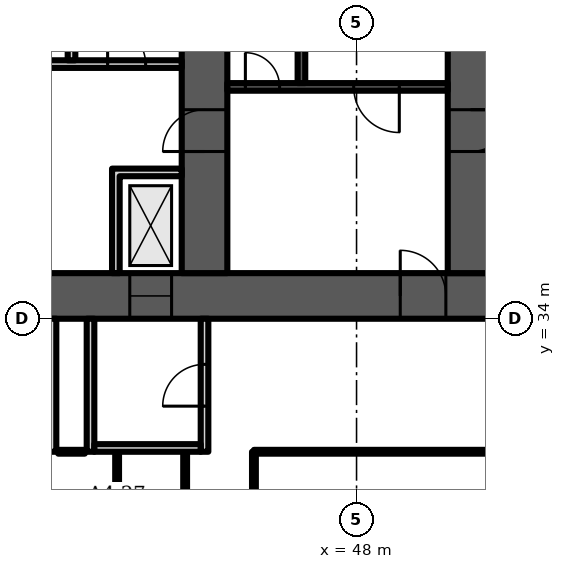
"""IFC4 building model, lengths in metres.
Left out: names, types, materials, properties, quantities, classifications, styles, units other than length and angle.
Written with IfcOpenShell. Run it as: python <this file> out.ifc"""

import sys

from ifc_helpers import new_model, si_unit, direction, frame, frame_2d, origin, place, context, subcontext, project, spatial, polyline, rectangle, outline, extrude, element, fill, save


model = new_model("IFC4")
c1 = context("Model", 3, precision=1e-05, world=origin(), true_north=direction((0.0, 1.0)))
c2 = subcontext(c1, "Body", "Model", "MODEL_VIEW")
j1 = project(units=[si_unit("LENGTHUNIT", "METRE"), si_unit("PLANEANGLEUNIT", "RADIAN")], contexts=[c1])
p1 = place(None, origin())
s1 = spatial("IfcSite", under=j1, at=p1, CompositionType="ELEMENT")
p2 = place(p1, origin())
s2 = spatial("IfcBuilding", under=s1, at=p2, CompositionType="ELEMENT")
p3 = place(p2, frame((0.0, 0.0, 81.1)))
s3 = spatial("IfcBuildingStorey", under=s2, at=p3, CompositionType="ELEMENT", Elevation=81.1)
p4 = place(p3, frame((9.0, 34.6, 0.0), z_axis=(0.0, 0.0, 1.0), x_axis=(1.0, 0.0, 0.0)))
e1 = element("IfcWall", 1, at=p4, inside=s3, PredefinedType="SHEAR", context=c2, shape_type="SweptSolid", body=[
    extrude(rectangle(XDim=56.0, YDim=1.2, at=frame_2d((28.0, 0.0))), origin(), (0.0, 0.0, 1.0), 3.6),
])
p5 = place(p4, frame((2.0, 0.0, 0.0)))
e2 = element("IfcOpeningElement", 2, at=p5, cuts=e1, PredefinedType="OPENING", context=c2, shape_type="SweptSolid", body=[
    extrude(rectangle(XDim=1.0, YDim=2.1, at=frame_2d((0.5, 1.05))), frame((0.0, 0.61, 0.0), z_axis=(0.0, -1.0, 0.0), x_axis=(1.0, 0.0, 0.0)), (0.0, 0.0, 1.0), 1.22),
])
p6 = place(p4, frame((4.6, 0.0, 0.0)))
e3 = element("IfcOpeningElement", 3, at=p6, cuts=e1, PredefinedType="OPENING", context=c2, shape_type="SweptSolid", body=[
    extrude(rectangle(XDim=1.0, YDim=2.1, at=frame_2d((0.5, 1.05))), frame((0.0, 0.61, 0.0), z_axis=(0.0, -1.0, 0.0), x_axis=(1.0, 0.0, 0.0)), (0.0, 0.0, 1.0), 1.22),
])
p7 = place(p4, frame((7.867, 0.0, 0.0)))
e4 = element("IfcOpeningElement", 4, at=p7, cuts=e1, PredefinedType="OPENING", context=c2, shape_type="SweptSolid", body=[
    extrude(rectangle(XDim=1.1, YDim=2.1, at=frame_2d((0.55, 1.05))), frame((0.0, 0.61, 0.0), z_axis=(0.0, -1.0, 0.0), x_axis=(1.0, 0.0, 0.0)), (0.0, 0.0, 1.0), 1.22),
])
p8 = place(p4, frame((12.033, 0.0, 0.0)))
e5 = element("IfcOpeningElement", 5, at=p8, cuts=e1, PredefinedType="OPENING", context=c2, shape_type="SweptSolid", body=[
    extrude(rectangle(XDim=1.1, YDim=2.1, at=frame_2d((0.55, 1.05))), frame((0.0, 0.61, 0.0), z_axis=(0.0, -1.0, 0.0), x_axis=(1.0, 0.0, 0.0)), (0.0, 0.0, 1.0), 1.22),
])
p9 = place(p4, frame((9.8, 0.0, 0.0)))
e6 = element("IfcOpeningElement", 6, at=p9, cuts=e1, PredefinedType="OPENING", context=c2, shape_type="SweptSolid", body=[
    extrude(rectangle(XDim=1.4, YDim=2.1, at=frame_2d((0.7, 1.05))), frame((0.0, 0.61, 0.0), z_axis=(0.0, -1.0, 0.0), x_axis=(1.0, 0.0, 0.0)), (0.0, 0.0, 1.0), 1.22),
])
p10 = place(p4, frame((14.65, 0.0, 0.0)))
e7 = element("IfcOpeningElement", 7, at=p10, cuts=e1, PredefinedType="OPENING", context=c2, shape_type="SweptSolid", body=[
    extrude(rectangle(XDim=1.2, YDim=2.1, at=frame_2d((0.6, 1.05))), frame((0.0, 0.61, 0.0), z_axis=(0.0, -1.0, 0.0), x_axis=(1.0, 0.0, 0.0)), (0.0, 0.0, 1.0), 1.22),
])
p11 = place(p4, frame((21.867, 0.0, 0.0)))
e8 = element("IfcOpeningElement", 8, at=p11, cuts=e1, PredefinedType="OPENING", context=c2, shape_type="SweptSolid", body=[
    extrude(rectangle(XDim=1.1, YDim=2.1, at=frame_2d((0.55, 1.05))), frame((0.0, 0.61, 0.0), z_axis=(0.0, -1.0, 0.0), x_axis=(1.0, 0.0, 0.0)), (0.0, 0.0, 1.0), 1.22),
])
p12 = place(p4, frame((26.033, 0.0, 0.0)))
e9 = element("IfcOpeningElement", 9, at=p12, cuts=e1, PredefinedType="OPENING", context=c2, shape_type="SweptSolid", body=[
    extrude(rectangle(XDim=1.1, YDim=2.1, at=frame_2d((0.55, 1.05))), frame((0.0, 0.61, 0.0), z_axis=(0.0, -1.0, 0.0), x_axis=(1.0, 0.0, 0.0)), (0.0, 0.0, 1.0), 1.22),
])
p13 = place(p4, frame((23.8, 0.0, 0.0)))
e10 = element("IfcOpeningElement", 10, at=p13, cuts=e1, PredefinedType="OPENING", context=c2, shape_type="SweptSolid", body=[
    extrude(rectangle(XDim=1.4, YDim=2.1, at=frame_2d((0.7, 1.05))), frame((0.0, 0.61, 0.0), z_axis=(0.0, -1.0, 0.0), x_axis=(1.0, 0.0, 0.0)), (0.0, 0.0, 1.0), 1.22),
])
p14 = place(p4, frame((28.867, 0.0, 0.0)))
e11 = element("IfcOpeningElement", 11, at=p14, cuts=e1, PredefinedType="OPENING", context=c2, shape_type="SweptSolid", body=[
    extrude(rectangle(XDim=1.1, YDim=2.1, at=frame_2d((0.55, 1.05))), frame((0.0, 0.61, 0.0), z_axis=(0.0, -1.0, 0.0), x_axis=(1.0, 0.0, 0.0)), (0.0, 0.0, 1.0), 1.22),
])
p15 = place(p4, frame((33.033, 0.0, 0.0)))
e12 = element("IfcOpeningElement", 12, at=p15, cuts=e1, PredefinedType="OPENING", context=c2, shape_type="SweptSolid", body=[
    extrude(rectangle(XDim=1.1, YDim=2.1, at=frame_2d((0.55, 1.05))), frame((0.0, 0.61, 0.0), z_axis=(0.0, -1.0, 0.0), x_axis=(1.0, 0.0, 0.0)), (0.0, 0.0, 1.0), 1.22),
])
p16 = place(p4, frame((40.15, 0.0, 0.0)))
e13 = element("IfcOpeningElement", 13, at=p16, cuts=e1, PredefinedType="OPENING", context=c2, shape_type="SweptSolid", body=[
    extrude(rectangle(XDim=1.2, YDim=2.1, at=frame_2d((0.6, 1.05))), frame((0.0, 0.61, 0.0), z_axis=(0.0, -1.0, 0.0), x_axis=(1.0, 0.0, 0.0)), (0.0, 0.0, 1.0), 1.22),
])
p17 = place(p4, frame((44.8, 0.0, 0.0)))
e14 = element("IfcOpeningElement", 14, at=p17, cuts=e1, PredefinedType="OPENING", context=c2, shape_type="SweptSolid", body=[
    extrude(rectangle(XDim=1.4, YDim=2.1, at=frame_2d((0.7, 1.05))), frame((0.0, 0.61, 0.0), z_axis=(0.0, -1.0, 0.0), x_axis=(1.0, 0.0, 0.0)), (0.0, 0.0, 1.0), 1.22),
])
p18 = place(p4, frame((49.867, 0.0, 0.0)))
e15 = element("IfcOpeningElement", 15, at=p18, cuts=e1, PredefinedType="OPENING", context=c2, shape_type="SweptSolid", body=[
    extrude(rectangle(XDim=1.1, YDim=2.1, at=frame_2d((0.55, 1.05))), frame((0.0, 0.61, 0.0), z_axis=(0.0, -1.0, 0.0), x_axis=(1.0, 0.0, 0.0)), (0.0, 0.0, 1.0), 1.22),
])
p19 = place(p4, frame((53.5, 0.0, 0.0)))
e16 = element("IfcOpeningElement", 16, at=p19, cuts=e1, PredefinedType="OPENING", context=c2, shape_type="SweptSolid", body=[
    extrude(rectangle(XDim=1.1, YDim=2.1, at=frame_2d((0.55, 1.05))), frame((0.0, 0.61, 0.0), z_axis=(0.0, -1.0, 0.0), x_axis=(1.0, 0.0, 0.0)), (0.0, 0.0, 1.0), 1.22),
])
p20 = place(p4, frame((51.567, 0.0, 0.0)))
e17 = element("IfcOpeningElement", 17, at=p20, cuts=e1, PredefinedType="OPENING", context=c2, shape_type="SweptSolid", body=[
    extrude(rectangle(XDim=1.4, YDim=2.1, at=frame_2d((0.7, 1.05))), frame((0.0, 0.61, 0.0), z_axis=(0.0, -1.0, 0.0), x_axis=(1.0, 0.0, 0.0)), (0.0, 0.0, 1.0), 1.22),
])
p21 = place(p3, frame((44.0, 35.2, 0.0), z_axis=(0.0, 0.0, 1.0), x_axis=(0.0, 1.0, 0.0)))
e18 = element("IfcWall", 18, at=p21, inside=s3, PredefinedType="SHEAR", context=c2, shape_type="SweptSolid", body=[
    extrude(rectangle(XDim=14.168, YDim=1.2, at=frame_2d((7.084, 0.0))), origin(), (0.0, 0.0, 1.0), 3.6),
])
p22 = place(p21, frame((3.2, 0.0, 0.0)))
e19 = element("IfcOpeningElement", 19, at=p22, cuts=e18, PredefinedType="OPENING", context=c2, shape_type="SweptSolid", body=[
    extrude(rectangle(XDim=1.1, YDim=2.1, at=frame_2d((0.55, 1.05))), frame((0.0, 0.61, 0.0), z_axis=(0.0, -1.0, 0.0), x_axis=(1.0, 0.0, 0.0)), (0.0, 0.0, 1.0), 1.22),
])
p23 = place(p21, frame((9.6, 0.0, 0.0)))
e20 = element("IfcOpeningElement", 20, at=p23, cuts=e18, PredefinedType="OPENING", context=c2, shape_type="SweptSolid", body=[
    extrude(rectangle(XDim=1.0, YDim=2.1, at=frame_2d((0.5, 1.05))), frame((0.0, 0.61, 0.0), z_axis=(0.0, -1.0, 0.0), x_axis=(1.0, 0.0, 0.0)), (0.0, 0.0, 1.0), 1.22),
])
p24 = place(p3, frame((51.0, 35.2, 0.0), z_axis=(0.0, 0.0, 1.0), x_axis=(0.0, 1.0, 0.0)))
e21 = element("IfcWall", 21, at=p24, inside=s3, PredefinedType="SHEAR", context=c2, shape_type="SweptSolid", body=[
    extrude(rectangle(XDim=13.555, YDim=1.2, at=frame_2d((6.778, 0.0))), origin(), (0.0, 0.0, 1.0), 3.6),
])
p25 = place(p24, frame((3.2, 0.0, 0.0)))
e22 = element("IfcOpeningElement", 22, at=p25, cuts=e21, PredefinedType="OPENING", context=c2, shape_type="SweptSolid", body=[
    extrude(rectangle(XDim=1.1, YDim=2.1, at=frame_2d((0.55, 1.05))), frame((0.0, 0.61, 0.0), z_axis=(0.0, -1.0, 0.0), x_axis=(1.0, 0.0, 0.0)), (0.0, 0.0, 1.0), 1.22),
])
p26 = place(p3, frame((37.6, 40.7, 0.0), z_axis=(0.0, 0.0, 1.0), x_axis=(1.0, 0.0, 0.0)))
e23 = element("IfcWall", 23, at=p26, inside=s3, PredefinedType="PARTITIONING", context=c2, shape_type="SweptSolid", body=[
    extrude(rectangle(XDim=5.8, YDim=0.2, at=frame_2d((2.9, 0.0))), origin(), (0.0, 0.0, 1.0), 3.2),
])
p27 = place(p26, frame((0.95, 0.0, 0.0)))
e24 = element("IfcOpeningElement", 24, at=p27, cuts=e23, PredefinedType="OPENING", context=c2, shape_type="SweptSolid", body=[
    extrude(rectangle(XDim=1.0, YDim=2.1, at=frame_2d((0.5, 1.05))), frame((0.0, 0.11, 0.0), z_axis=(0.0, -1.0, 0.0), x_axis=(1.0, 0.0, 0.0)), (0.0, 0.0, 1.0), 0.22),
])
p28 = place(p26, frame((3.85, 0.0, 0.0)))
e25 = element("IfcOpeningElement", 25, at=p28, cuts=e23, PredefinedType="OPENING", context=c2, shape_type="SweptSolid", body=[
    extrude(rectangle(XDim=1.0, YDim=2.1, at=frame_2d((0.5, 1.05))), frame((0.0, 0.11, 0.0), z_axis=(0.0, -1.0, 0.0), x_axis=(1.0, 0.0, 0.0)), (0.0, 0.0, 1.0), 0.22),
])
p29 = place(p3, frame((0.0, 0.0, -0.0)))
e26 = element("IfcWall", 26, at=p29, inside=s3, PredefinedType="PARTITIONING", context=c2, shape_type="SweptSolid", body=[
    extrude(outline(polyline([(41.567, 37.95), (41.767, 37.95), (43.4, 37.95), (43.4, 37.75), (41.767, 37.75), (41.767, 35.2), (41.567, 35.2), (41.567, 37.95)])), origin(), (0.0, 0.0, 1.0), 3.2),
])
p30 = place(p3, frame((40.5, 40.8, 0.0), z_axis=(0.0, 0.0, 1.0), x_axis=(0.0, 1.0, 0.0)))
e27 = element("IfcWall", 27, at=p30, inside=s3, PredefinedType="PARTITIONING", context=c2, shape_type="SweptSolid", body=[
    extrude(rectangle(XDim=8.653, YDim=0.2, at=frame_2d((4.326, 0.0))), origin(), (0.0, 0.0, 1.0), 3.2),
])
p31 = place(p3, frame((44.6, 40.1, 0.0), z_axis=(0.0, 0.0, 1.0), x_axis=(1.0, 0.0, 0.0)))
e28 = element("IfcWall", 28, at=p31, inside=s3, PredefinedType="SHEAR", context=c2, shape_type="SweptSolid", body=[
    extrude(rectangle(XDim=5.8, YDim=0.2, at=frame_2d((2.9, 0.0))), origin(), (0.0, 0.0, 1.0), 3.2),
])
p32 = place(p31, frame((3.325, 0.0, 0.0)))
e29 = element("IfcOpeningElement", 29, at=p32, cuts=e28, PredefinedType="OPENING", context=c2, shape_type="SweptSolid", body=[
    extrude(rectangle(XDim=1.2, YDim=2.1, at=frame_2d((0.6, 1.05))), frame((0.0, 0.11, 0.0), z_axis=(0.0, -1.0, 0.0), x_axis=(1.0, 0.0, 0.0)), (0.0, 0.0, 1.0), 0.22),
])
p33 = place(p31, frame((0.475, 0.0, 0.0)))
e30 = element("IfcOpeningElement", 30, at=p33, cuts=e28, PredefinedType="OPENING", context=c2, shape_type="SweptSolid", body=[
    extrude(rectangle(XDim=0.9, YDim=2.1, at=frame_2d((0.45, 1.05))), frame((0.0, 0.11, 0.0), z_axis=(0.0, -1.0, 0.0), x_axis=(1.0, 0.0, 0.0)), (0.0, 0.0, 1.0), 0.22),
])
p34 = place(p3, frame((46.55, 40.2, 0.0), z_axis=(0.0, 0.0, 1.0), x_axis=(0.0, 1.0, 0.0)))
e31 = element("IfcWall", 31, at=p34, inside=s3, PredefinedType="SHEAR", context=c2, shape_type="SweptSolid", body=[
    extrude(rectangle(XDim=7.2, YDim=0.2, at=frame_2d((3.6, 0.0))), origin(), (0.0, 0.0, 1.0), 3.2),
])
for number, where, z_axis, x_axis in (
    (32, (40.0, 30.5, 0.0), (0.0, 0.0, 1.0), (0.0, 1.0, 0.0)),
    (33, (41.0, 30.5, 0.0), (0.0, 0.0, 1.0), (0.0, 1.0, 0.0)),
):
    element("IfcWall", number, at=place(p3, frame(where, z_axis=z_axis, x_axis=x_axis)), inside=s3, PredefinedType="PARTITIONING", context=c2, shape_type="SweptSolid", body=[
        extrude(rectangle(XDim=3.5, YDim=0.2, at=frame_2d((1.75, 0.0))), origin(), (0.0, 0.0, 1.0), 3.2),
    ])
p35 = place(p3, frame((44.0, 30.5, 0.0), z_axis=(0.0, 0.0, 1.0), x_axis=(0.0, 1.0, 0.0)))
e34 = element("IfcWall", 34, at=p35, inside=s3, PredefinedType="PARTITIONING", context=c2, shape_type="SweptSolid", body=[
    extrude(rectangle(XDim=3.5, YDim=0.2, at=frame_2d((1.75, 0.0))), origin(), (0.0, 0.0, 1.0), 3.2),
])
p36 = place(p35, frame((1.2, 0.0, 0.0)))
e35 = element("IfcOpeningElement", 35, at=p36, cuts=e34, PredefinedType="OPENING", context=c2, shape_type="SweptSolid", body=[
    extrude(rectangle(XDim=1.1, YDim=2.1, at=frame_2d((0.55, 1.05))), frame((0.0, 0.11, 0.0), z_axis=(0.0, -1.0, 0.0), x_axis=(1.0, 0.0, 0.0)), (0.0, 0.0, 1.0), 0.22),
])
p37 = place(p3, frame((41.1, 30.6, 0.0), z_axis=(0.0, 0.0, 1.0), x_axis=(1.0, 0.0, 0.0)))
e36 = element("IfcWall", 36, at=p37, inside=s3, PredefinedType="PARTITIONING", context=c2, shape_type="SweptSolid", body=[
    extrude(rectangle(XDim=2.8, YDim=0.2, at=frame_2d((1.4, 0.0))), origin(), (0.0, 0.0, 1.0), 3.2),
])
p38 = place(p3, frame((41.7, 13.24, 0.0), z_axis=(0.0, 0.0, 1.0), x_axis=(0.0, 1.0, 0.0)))
e37 = element("IfcWall", 37, at=p38, inside=s3, PredefinedType="PARTITIONING", context=c2, shape_type="SweptSolid", body=[
    extrude(rectangle(XDim=17.25, YDim=0.1, at=frame_2d((8.625, 0.0))), origin(), (0.0, 0.0, 1.0), 3.2),
])
p39 = place(p38, frame((3.046, 0.0, 0.0)))
e38 = element("IfcOpeningElement", 38, at=p39, cuts=e37, PredefinedType="OPENING", context=c2, shape_type="SweptSolid", body=[
    extrude(rectangle(XDim=0.9, YDim=2.1, at=frame_2d((0.45, 1.05))), frame((0.0, 0.06, 0.0), z_axis=(0.0, -1.0, 0.0), x_axis=(1.0, 0.0, 0.0)), (0.0, 0.0, 1.0), 0.12),
])
p40 = place(p38, frame((9.465, 0.0, 0.0)))
e39 = element("IfcOpeningElement", 39, at=p40, cuts=e37, PredefinedType="OPENING", context=c2, shape_type="SweptSolid", body=[
    extrude(rectangle(XDim=0.9, YDim=2.1, at=frame_2d((0.45, 1.05))), frame((0.0, 0.06, 0.0), z_axis=(0.0, -1.0, 0.0), x_axis=(1.0, 0.0, 0.0)), (0.0, 0.0, 1.0), 0.12),
])
p41 = place(p38, frame((14.64, 0.0, 0.0)))
e40 = element("IfcOpeningElement", 40, at=p41, cuts=e37, PredefinedType="OPENING", context=c2, shape_type="SweptSolid", body=[
    extrude(rectangle(XDim=1.0, YDim=2.1, at=frame_2d((0.5, 1.05))), frame((0.0, 0.06, 0.0), z_axis=(0.0, -1.0, 0.0), x_axis=(1.0, 0.0, 0.0)), (0.0, 0.0, 1.0), 0.12),
])
p42 = place(p3, frame((43.49, 13.24, 0.0), z_axis=(0.0, 0.0, 1.0), x_axis=(0.0, 1.0, 0.0)))
e41 = element("IfcWall", 41, at=p42, inside=s3, PredefinedType="PARTITIONING", context=c2, shape_type="SweptSolid", body=[
    extrude(rectangle(XDim=17.25, YDim=0.1, at=frame_2d((8.625, 0.0))), origin(), (0.0, 0.0, 1.0), 3.2),
])
p43 = place(p42, frame((8.139, 0.0, 0.0)))
e42 = element("IfcOpeningElement", 42, at=p43, cuts=e41, PredefinedType="OPENING", context=c2, shape_type="SweptSolid", body=[
    extrude(rectangle(XDim=1.0, YDim=2.1, at=frame_2d((0.5, 1.05))), frame((0.0, 0.06, 0.0), z_axis=(0.0, -1.0, 0.0), x_axis=(1.0, 0.0, 0.0)), (0.0, 0.0, 1.0), 0.12),
])
p44 = place(p3, frame((45.3, -3.943, 0.0), z_axis=(0.0, 0.0, 1.0), x_axis=(0.0, 1.0, 0.0)))
e43 = element("IfcWall", 43, at=p44, inside=s3, PredefinedType="PARTITIONING", context=c2, shape_type="SweptSolid", body=[
    extrude(rectangle(XDim=34.443, YDim=0.1, at=frame_2d((17.222, 0.0))), origin(), (0.0, 0.0, 1.0), 2.58),
])
p45 = place(p44, frame((1.598, 0.0, 0.0)))
e44 = element("IfcOpeningElement", 44, at=p45, cuts=e43, PredefinedType="OPENING", context=c2, shape_type="SweptSolid", body=[
    extrude(rectangle(XDim=1.0, YDim=2.1, at=frame_2d((0.5, 1.05))), frame((0.0, 0.06, 0.0), z_axis=(0.0, -1.0, 0.0), x_axis=(1.0, 0.0, 0.0)), (0.0, 0.0, 1.0), 0.12),
])
p46 = place(p44, frame((5.853, 0.0, 0.0)))
e45 = element("IfcOpeningElement", 45, at=p46, cuts=e43, PredefinedType="OPENING", context=c2, shape_type="SweptSolid", body=[
    extrude(rectangle(XDim=1.0, YDim=2.1, at=frame_2d((0.5, 1.05))), frame((0.0, 0.06, 0.0), z_axis=(0.0, -1.0, 0.0), x_axis=(1.0, 0.0, 0.0)), (0.0, 0.0, 1.0), 0.12),
])
p47 = place(p44, frame((10.173, 0.0, 0.0)))
e46 = element("IfcOpeningElement", 46, at=p47, cuts=e43, PredefinedType="OPENING", context=c2, shape_type="SweptSolid", body=[
    extrude(rectangle(XDim=1.0, YDim=2.1, at=frame_2d((0.5, 1.05))), frame((0.0, 0.06, 0.0), z_axis=(0.0, -1.0, 0.0), x_axis=(1.0, 0.0, 0.0)), (0.0, 0.0, 1.0), 0.12),
])
p48 = place(p44, frame((14.488, 0.0, 0.0)))
e47 = element("IfcOpeningElement", 47, at=p48, cuts=e43, PredefinedType="OPENING", context=c2, shape_type="SweptSolid", body=[
    extrude(rectangle(XDim=1.0, YDim=2.1, at=frame_2d((0.5, 1.05))), frame((0.0, 0.06, 0.0), z_axis=(0.0, -1.0, 0.0), x_axis=(1.0, 0.0, 0.0)), (0.0, 0.0, 1.0), 0.12),
])
p49 = place(p44, frame((31.403, 0.0, 0.0)))
e48 = element("IfcOpeningElement", 48, at=p49, cuts=e43, PredefinedType="OPENING", context=c2, shape_type="SweptSolid", body=[
    extrude(rectangle(XDim=1.0, YDim=2.1, at=frame_2d((0.5, 1.05))), frame((0.0, 0.06, 0.0), z_axis=(0.0, -1.0, 0.0), x_axis=(1.0, 0.0, 0.0)), (0.0, 0.0, 1.0), 0.12),
])
p50 = place(p3, frame((45.3, 30.5, 0.0), z_axis=(0.0, 0.0, 1.0), x_axis=(1.0, 0.0, 0.0)))
e49 = element("IfcWall", 49, at=p50, inside=s3, PredefinedType="PARTITIONING", context=c2, shape_type="SweptSolid", body=[
    extrude(rectangle(XDim=19.7, YDim=0.1, at=frame_2d((9.85, 0.0))), origin(), (0.0, 0.0, 1.0), 3.2),
])
p51 = place(p3, frame((40.15, 30.5, 0.0), z_axis=(0.0, 0.0, 1.0), x_axis=(1.0, 0.0, 0.0)))
e50 = element("IfcWall", 50, at=p51, inside=s3, PredefinedType="PARTITIONING", context=c2, shape_type="SweptSolid", body=[
    extrude(rectangle(XDim=0.7, YDim=0.1, at=frame_2d((0.35, 0.0))), origin(), (0.0, 0.0, 1.0), 3.2),
])
p52 = place(p15, origin())
e51 = element("IfcDoor", 51, at=p52, inside=s3, OperationType="DOUBLE_DOOR_SLIDING", PredefinedType="DOOR", context=c2, shape_type="SweptSolid", body=[
    extrude(rectangle(XDim=1.1, YDim=2.1, at=frame_2d((0.55, 1.05))), frame((0.0, 0.025, 0.0), z_axis=(0.0, -1.0, 0.0), x_axis=(1.0, 0.0, 0.0)), (0.0, 0.0, 1.0), 0.05),
])
fill(e12, e51)
p53 = place(p28, origin())
e52 = element("IfcDoor", 52, at=p53, inside=s3, OperationType="SINGLE_SWING_LEFT", PredefinedType="DOOR", context=c2, shape_type="SweptSolid", body=[
    extrude(rectangle(XDim=1.0, YDim=2.1, at=frame_2d((0.5, 1.05))), frame((0.0, 0.025, 0.0), z_axis=(0.0, -1.0, 0.0), x_axis=(1.0, 0.0, 0.0)), (0.0, 0.0, 1.0), 0.05),
])
fill(e25, e52)
p54 = place(p32, origin())
e53 = element("IfcDoor", 53, at=p54, inside=s3, OperationType="SINGLE_SWING_RIGHT", PredefinedType="DOOR", context=c2, shape_type="SweptSolid", body=[
    extrude(rectangle(XDim=1.2, YDim=2.1, at=frame_2d((0.6, 1.05))), frame((0.0, 0.025, 0.0), z_axis=(0.0, -1.0, 0.0), x_axis=(1.0, 0.0, 0.0)), (0.0, 0.0, 1.0), 0.05),
])
fill(e29, e53)
p55 = place(p33, origin())
e54 = element("IfcDoor", 54, at=p55, inside=s3, OperationType="SINGLE_SWING_LEFT", PredefinedType="DOOR", context=c2, shape_type="SweptSolid", body=[
    extrude(rectangle(XDim=0.9, YDim=2.1, at=frame_2d((0.45, 1.05))), frame((0.0, 0.025, 0.0), z_axis=(0.0, -1.0, 0.0), x_axis=(1.0, 0.0, 0.0)), (0.0, 0.0, 1.0), 0.05),
])
fill(e30, e54)
p56 = place(p16, origin())
e55 = element("IfcDoor", 55, at=p56, inside=s3, OperationType="SINGLE_SWING_LEFT", PredefinedType="DOOR", context=c2, shape_type="SweptSolid", body=[
    extrude(rectangle(XDim=1.2, YDim=2.1, at=frame_2d((0.6, 1.05))), frame((0.0, 0.025, 0.0), z_axis=(0.0, -1.0, 0.0), x_axis=(1.0, 0.0, 0.0)), (0.0, 0.0, 1.0), 0.05),
])
fill(e13, e55)
p57 = place(p22, origin())
e56 = element("IfcDoor", 56, at=p57, inside=s3, OperationType="SINGLE_SWING_LEFT", PredefinedType="DOOR", context=c2, shape_type="SweptSolid", body=[
    extrude(rectangle(XDim=1.1, YDim=2.1, at=frame_2d((0.55, 1.05))), frame((0.0, 0.025, 0.0), z_axis=(0.0, -1.0, 0.0), x_axis=(1.0, 0.0, 0.0)), (0.0, 0.0, 1.0), 0.05),
])
fill(e19, e56)
p58 = place(p25, origin())
e57 = element("IfcDoor", 57, at=p58, inside=s3, OperationType="SINGLE_SWING_RIGHT", PredefinedType="DOOR", context=c2, shape_type="SweptSolid", body=[
    extrude(rectangle(XDim=1.1, YDim=2.1, at=frame_2d((0.55, 1.05))), frame((0.0, 0.025, 0.0), z_axis=(0.0, -1.0, 0.0), x_axis=(1.0, 0.0, 0.0)), (0.0, 0.0, 1.0), 0.05),
])
fill(e22, e57)
p59 = place(p36, origin())
e58 = element("IfcDoor", 58, at=p59, inside=s3, OperationType="SINGLE_SWING_LEFT", PredefinedType="DOOR", context=c2, shape_type="SweptSolid", body=[
    extrude(rectangle(XDim=1.1, YDim=2.1, at=frame_2d((0.55, 1.05))), frame((0.0, 0.025, 0.0), z_axis=(0.0, -1.0, 0.0), x_axis=(1.0, 0.0, 0.0)), (0.0, 0.0, 1.0), 0.05),
])
fill(e35, e58)
save(model, sys.argv[1])
